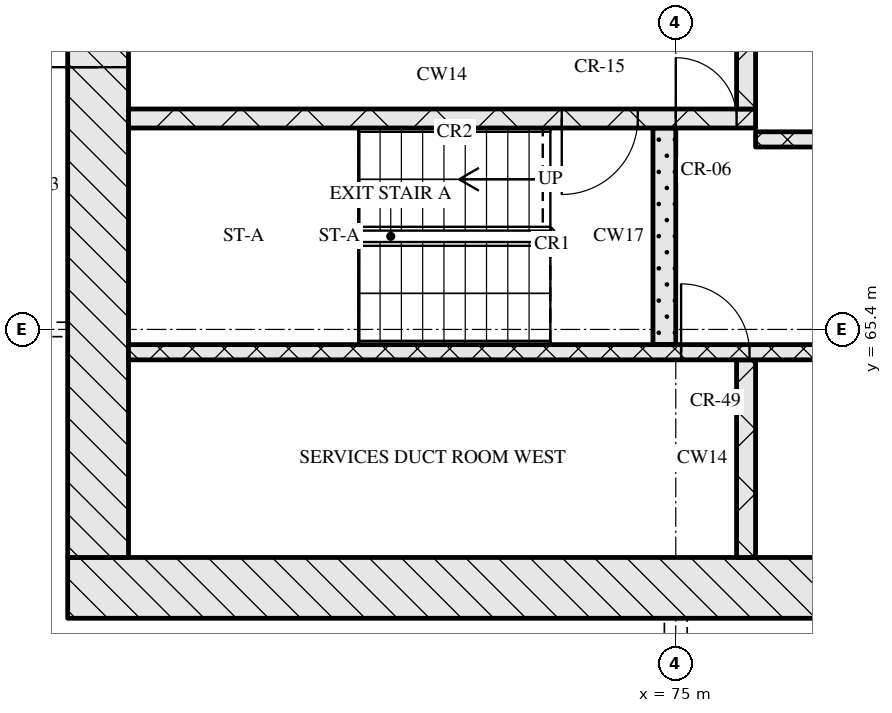
"""IFC4 building model, lengths in metres.
Left out: names, types, materials, properties, quantities, classifications, styles, units other than length and angle.
Written with IfcOpenShell. Run it as: python <this file> out.ifc"""

import sys

from ifc_helpers import new_model, si_unit, direction, frame, frame_2d, origin, place, context, subcontext, project, spatial, rectangle, extrude, element, fill, save


model = new_model("IFC4")
c1 = context("Model", 3, precision=1e-05, world=origin(), true_north=direction((0.0, 1.0)))
c2 = subcontext(c1, "Body", "Model", "MODEL_VIEW")
j1 = project(units=[si_unit("LENGTHUNIT", "METRE"), si_unit("PLANEANGLEUNIT", "RADIAN")], contexts=[c1])
p1 = place(None, origin())
s1 = spatial("IfcSite", under=j1, at=p1, CompositionType="ELEMENT")
p2 = place(p1, origin())
s2 = spatial("IfcBuilding", under=s1, at=p2, CompositionType="ELEMENT")
p3 = place(p2, frame((0.0, 0.0, 151.05)))
s3 = spatial("IfcBuildingStorey", under=s2, at=p3, CompositionType="ELEMENT", Elevation=151.05)
p4 = place(p3, frame((67.0, 62.0, 0.0), z_axis=(0.0, 0.0, 1.0), x_axis=(1.0, 0.0, 0.0)))
e1 = element("IfcWall", 1, at=p4, inside=s3, PredefinedType="SOLIDWALL", context=c2, shape_type="SweptSolid", body=[
    extrude(rectangle(XDim=41.2, YDim=0.8, at=frame_2d((20.6, 0.0))), origin(), (0.0, 0.0, 1.0), 3.32),
])
p5 = place(p4, frame((20.95, 0.0, 0.0)))
e2 = element("IfcOpeningElement", 2, at=p5, cuts=e1, PredefinedType="OPENING", context=c2, shape_type="SweptSolid", body=[
    extrude(rectangle(XDim=1.8, YDim=2.1, at=frame_2d((0.9, 1.05))), frame((0.0, 0.41, 0.0), z_axis=(0.0, -1.0, 0.0), x_axis=(1.0, 0.0, 0.0)), (0.0, 0.0, 1.0), 0.82),
])
p6 = place(p3, frame((67.4, 62.4, 0.0), z_axis=(0.0, 0.0, 1.0), x_axis=(0.0, 1.0, 0.0)))
e3 = element("IfcWall", 3, at=p6, inside=s3, PredefinedType="SOLIDWALL", context=c2, shape_type="SweptSolid", body=[
    extrude(rectangle(XDim=12.0, YDim=0.8, at=frame_2d((6.0, 0.0))), origin(), (0.0, 0.0, 1.0), 3.32),
])
p7 = place(p6, frame((6.45, 0.0, 0.0)))
e4 = element("IfcOpeningElement", 4, at=p7, cuts=e3, PredefinedType="OPENING", context=c2, shape_type="SweptSolid", body=[
    extrude(rectangle(XDim=1.2, YDim=2.1, at=frame_2d((0.6, 1.05))), frame((0.0, 0.41, 0.0), z_axis=(0.0, -1.0, 0.0), x_axis=(1.0, 0.0, 0.0)), (0.0, 0.0, 1.0), 0.82),
])
p8 = place(p3, frame((75.925, 62.4, 0.0), z_axis=(0.0, 0.0, 1.0), x_axis=(0.0, 1.0, 0.0)))
e5 = element("IfcWall", 5, at=p8, inside=s3, PredefinedType="SOLIDWALL", context=c2, shape_type="SweptSolid", body=[
    extrude(rectangle(XDim=2.6, YDim=0.25, at=frame_2d((1.3, 0.0))), origin(), (0.0, 0.0, 1.0), 3.32),
])
p9 = place(p3, frame((67.8, 65.1, 0.0), z_axis=(0.0, 0.0, 1.0), x_axis=(1.0, 0.0, 0.0)))
e6 = element("IfcWall", 6, at=p9, inside=s3, PredefinedType="SOLIDWALL", context=c2, shape_type="SweptSolid", body=[
    extrude(rectangle(XDim=18.5, YDim=0.2, at=frame_2d((9.25, 0.0))), origin(), (0.0, 0.0, 1.0), 3.32),
])
p10 = place(p9, frame((7.27, 0.0, 0.0)))
e7 = element("IfcOpeningElement", 7, at=p10, cuts=e6, PredefinedType="OPENING", context=c2, shape_type="SweptSolid", body=[
    extrude(rectangle(XDim=0.9, YDim=2.1, at=frame_2d((0.45, 1.05))), frame((0.0, 0.11, 0.0), z_axis=(0.0, -1.0, 0.0), x_axis=(1.0, 0.0, 0.0)), (0.0, 0.0, 1.0), 0.22),
])
p11 = place(p9, frame((11.45, 0.0, 0.0)))
e8 = element("IfcOpeningElement", 8, at=p11, cuts=e6, PredefinedType="OPENING", context=c2, shape_type="SweptSolid", body=[
    extrude(rectangle(XDim=0.9, YDim=2.1, at=frame_2d((0.45, 1.05))), frame((0.0, 0.11, 0.0), z_axis=(0.0, -1.0, 0.0), x_axis=(1.0, 0.0, 0.0)), (0.0, 0.0, 1.0), 0.22),
])
p12 = place(p9, frame((16.7, 0.0, 0.0)))
e9 = element("IfcOpeningElement", 9, at=p12, cuts=e6, PredefinedType="OPENING", context=c2, shape_type="SweptSolid", body=[
    extrude(rectangle(XDim=0.9, YDim=2.1, at=frame_2d((0.45, 1.05))), frame((0.0, 0.11, 0.0), z_axis=(0.0, -1.0, 0.0), x_axis=(1.0, 0.0, 0.0)), (0.0, 0.0, 1.0), 0.22),
])
p13 = place(p3, frame((74.85, 65.2, 0.0), z_axis=(0.0, 0.0, 1.0), x_axis=(0.0, 1.0, 0.0)))
e10 = element("IfcWall", 10, at=p13, inside=s3, PredefinedType="SOLIDWALL", context=c2, shape_type="SweptSolid", body=[
    extrude(rectangle(XDim=2.85, YDim=0.3, at=frame_2d((1.425, 0.0))), origin(), (0.0, 0.0, 1.0), 3.32),
])
p14 = place(p3, frame((76.05, 67.9, 0.0), z_axis=(0.0, 0.0, 1.0), x_axis=(1.0, 0.0, 0.0)))
e11 = element("IfcWall", 11, at=p14, inside=s3, PredefinedType="SOLIDWALL", context=c2, shape_type="SweptSolid", body=[
    extrude(rectangle(XDim=23.1, YDim=0.2, at=frame_2d((11.55, 0.0))), origin(), (0.0, 0.0, 1.0), 3.32),
])
p15 = place(p14, frame((1.4, 0.0, 0.0)))
e12 = element("IfcOpeningElement", 12, at=p15, cuts=e11, PredefinedType="OPENING", context=c2, shape_type="SweptSolid", body=[
    extrude(rectangle(XDim=0.9, YDim=2.1, at=frame_2d((0.45, 1.05))), frame((0.0, 0.11, 0.0), z_axis=(0.0, -1.0, 0.0), x_axis=(1.0, 0.0, 0.0)), (0.0, 0.0, 1.0), 0.22),
])
p16 = place(p14, frame((5.11, 0.0, 0.0)))
e13 = element("IfcOpeningElement", 13, at=p16, cuts=e11, PredefinedType="OPENING", context=c2, shape_type="SweptSolid", body=[
    extrude(rectangle(XDim=0.9, YDim=2.1, at=frame_2d((0.45, 1.05))), frame((0.0, 0.11, 0.0), z_axis=(0.0, -1.0, 0.0), x_axis=(1.0, 0.0, 0.0)), (0.0, 0.0, 1.0), 0.22),
])
p17 = place(p14, frame((8.45, 0.0, 0.0)))
e14 = element("IfcOpeningElement", 14, at=p17, cuts=e11, PredefinedType="OPENING", context=c2, shape_type="SweptSolid", body=[
    extrude(rectangle(XDim=0.9, YDim=2.1, at=frame_2d((0.45, 1.05))), frame((0.0, 0.11, 0.0), z_axis=(0.0, -1.0, 0.0), x_axis=(1.0, 0.0, 0.0)), (0.0, 0.0, 1.0), 0.22),
])
p18 = place(p14, frame((10.91, 0.0, 0.0)))
e15 = element("IfcOpeningElement", 15, at=p18, cuts=e11, PredefinedType="OPENING", context=c2, shape_type="SweptSolid", body=[
    extrude(rectangle(XDim=0.9, YDim=2.1, at=frame_2d((0.45, 1.05))), frame((0.0, 0.11, 0.0), z_axis=(0.0, -1.0, 0.0), x_axis=(1.0, 0.0, 0.0)), (0.0, 0.0, 1.0), 0.22),
])
p19 = place(p14, frame((13.55, 0.0, 0.0)))
e16 = element("IfcOpeningElement", 16, at=p19, cuts=e11, PredefinedType="OPENING", context=c2, shape_type="SweptSolid", body=[
    extrude(rectangle(XDim=1.0, YDim=2.1, at=frame_2d((0.5, 1.05))), frame((0.0, 0.11, 0.0), z_axis=(0.0, -1.0, 0.0), x_axis=(1.0, 0.0, 0.0)), (0.0, 0.0, 1.0), 0.22),
])
p20 = place(p14, frame((16.2, 0.0, 0.0)))
e17 = element("IfcOpeningElement", 17, at=p20, cuts=e11, PredefinedType="OPENING", context=c2, shape_type="SweptSolid", body=[
    extrude(rectangle(XDim=1.1, YDim=2.1, at=frame_2d((0.55, 1.05))), frame((0.0, 0.11, 0.0), z_axis=(0.0, -1.0, 0.0), x_axis=(1.0, 0.0, 0.0)), (0.0, 0.0, 1.0), 0.22),
])
p21 = place(p14, frame((18.7, 0.0, 0.0)))
e18 = element("IfcOpeningElement", 18, at=p21, cuts=e11, PredefinedType="OPENING", context=c2, shape_type="SweptSolid", body=[
    extrude(rectangle(XDim=1.1, YDim=2.1, at=frame_2d((0.55, 1.05))), frame((0.0, 0.11, 0.0), z_axis=(0.0, -1.0, 0.0), x_axis=(1.0, 0.0, 0.0)), (0.0, 0.0, 1.0), 0.22),
])
p22 = place(p14, frame((21.2, 0.0, 0.0)))
e19 = element("IfcOpeningElement", 19, at=p22, cuts=e11, PredefinedType="OPENING", context=c2, shape_type="SweptSolid", body=[
    extrude(rectangle(XDim=1.1, YDim=2.1, at=frame_2d((0.55, 1.05))), frame((0.0, 0.11, 0.0), z_axis=(0.0, -1.0, 0.0), x_axis=(1.0, 0.0, 0.0)), (0.0, 0.0, 1.0), 0.22),
])
p23 = place(p3, frame((67.8, 68.175, 0.0), z_axis=(0.0, 0.0, 1.0), x_axis=(1.0, 0.0, 0.0)))
e20 = element("IfcWall", 20, at=p23, inside=s3, PredefinedType="SOLIDWALL", context=c2, shape_type="SweptSolid", body=[
    extrude(rectangle(XDim=8.25, YDim=0.25, at=frame_2d((4.125, 0.0))), origin(), (0.0, 0.0, 1.0), 3.32),
])
p24 = place(p23, frame((5.7, 0.0, 0.0)))
e21 = element("IfcOpeningElement", 21, at=p24, cuts=e20, PredefinedType="OPENING", context=c2, shape_type="SweptSolid", body=[
    extrude(rectangle(XDim=1.0, YDim=2.1, at=frame_2d((0.5, 1.05))), frame((0.0, 0.135, 0.0), z_axis=(0.0, -1.0, 0.0), x_axis=(1.0, 0.0, 0.0)), (0.0, 0.0, 1.0), 0.27),
])
p25 = place(p23, frame((7.2, 0.0, 0.0)))
e22 = element("IfcOpeningElement", 22, at=p25, cuts=e20, PredefinedType="OPENING", context=c2, shape_type="SweptSolid", body=[
    extrude(rectangle(XDim=0.8, YDim=2.1, at=frame_2d((0.4, 1.05))), frame((0.0, 0.135, 0.0), z_axis=(0.0, -1.0, 0.0), x_axis=(1.0, 0.0, 0.0)), (0.0, 0.0, 1.0), 0.27),
])
p26 = place(p3, frame((75.925, 68.3, 0.0), z_axis=(0.0, 0.0, 1.0), x_axis=(0.0, 1.0, 0.0)))
e23 = element("IfcWall", 23, at=p26, inside=s3, PredefinedType="SOLIDWALL", context=c2, shape_type="SweptSolid", body=[
    extrude(rectangle(XDim=2.3, YDim=0.25, at=frame_2d((1.15, 0.0))), origin(), (0.0, 0.0, 1.0), 3.32),
])
p27 = place(p10, origin())
e24 = element("IfcDoor", 24, at=p27, inside=s3, OperationType="SINGLE_SWING_LEFT", PredefinedType="DOOR", context=c2, shape_type="SweptSolid", body=[
    extrude(rectangle(XDim=0.9, YDim=2.1, at=frame_2d((0.45, 1.05))), frame((0.0, 0.025, 0.0), z_axis=(0.0, -1.0, 0.0), x_axis=(1.0, 0.0, 0.0)), (0.0, 0.0, 1.0), 0.05),
])
fill(e7, e24)
p28 = place(p24, origin())
e25 = element("IfcDoor", 25, at=p28, inside=s3, OperationType="SINGLE_SWING_RIGHT", PredefinedType="DOOR", context=c2, shape_type="SweptSolid", body=[
    extrude(rectangle(XDim=1.0, YDim=2.1, at=frame_2d((0.5, 1.05))), frame((0.0, 0.025, 0.0), z_axis=(0.0, -1.0, 0.0), x_axis=(1.0, 0.0, 0.0)), (0.0, 0.0, 1.0), 0.05),
])
fill(e21, e25)
p29 = place(p25, origin())
e26 = element("IfcDoor", 26, at=p29, inside=s3, OperationType="SINGLE_SWING_LEFT", PredefinedType="DOOR", context=c2, shape_type="SweptSolid", body=[
    extrude(rectangle(XDim=0.8, YDim=2.1, at=frame_2d((0.4, 1.05))), frame((0.0, 0.025, 0.0), z_axis=(0.0, -1.0, 0.0), x_axis=(1.0, 0.0, 0.0)), (0.0, 0.0, 1.0), 0.05),
])
fill(e22, e26)
p30 = place(p7, origin())
e27 = element("IfcDoor", 27, at=p30, inside=s3, OperationType="SINGLE_SWING_LEFT", PredefinedType="DOOR", context=c2, shape_type="SweptSolid", body=[
    extrude(rectangle(XDim=1.2, YDim=2.1, at=frame_2d((0.6, 1.05))), frame((0.0, 0.025, 0.0), z_axis=(0.0, -1.0, 0.0), x_axis=(1.0, 0.0, 0.0)), (0.0, 0.0, 1.0), 0.05),
])
fill(e4, e27)
save(model, sys.argv[1])
